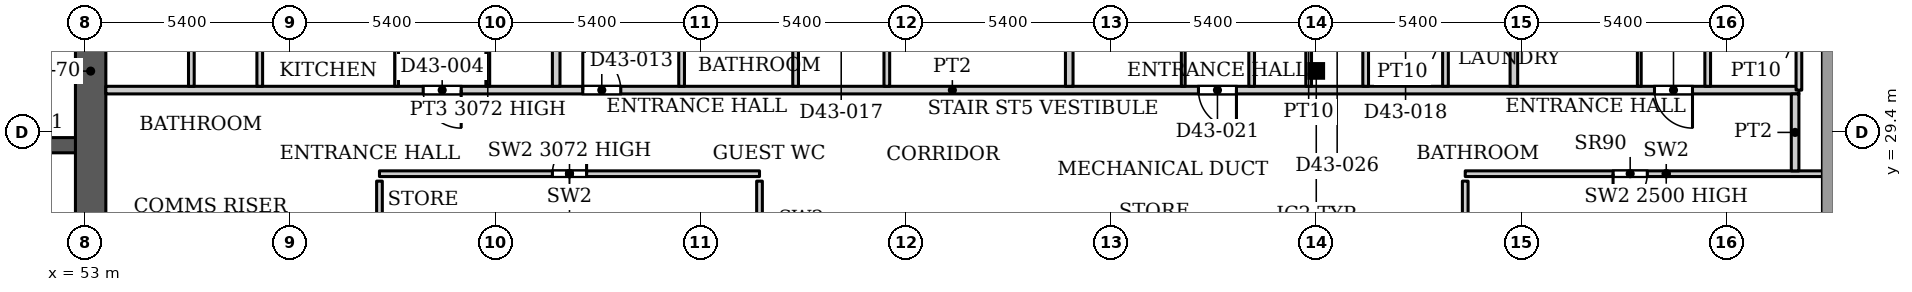
"""IFC4 building model, lengths in metres.
Left out: names, types, materials, properties, quantities, classifications, styles, units other than length and angle.
Written with IfcOpenShell. Run it as: python <this file> out.ifc"""

import sys

from ifc_helpers import new_model, si_unit, direction, frame, frame_2d, origin, origin_2d, place, context, subcontext, project, spatial, rectangle, hollow_rectangle, extrude, source, transform, mapped, element, fill, save


model = new_model("IFC4")
c1 = context("Model", 3, precision=1e-05, world=origin(), true_north=direction((0.0, 1.0)))
c2 = subcontext(c1, "Body", "Model", "MODEL_VIEW")
j1 = project(units=[si_unit("LENGTHUNIT", "METRE"), si_unit("PLANEANGLEUNIT", "RADIAN")], contexts=[c1])
p1 = place(None, origin())
s1 = spatial("IfcSite", under=j1, at=p1, CompositionType="ELEMENT")
p2 = place(p1, origin())
s2 = spatial("IfcBuilding", under=s1, at=p2, CompositionType="ELEMENT")
p3 = place(p2, frame((0.0, 0.0, 191.6)))
s3 = spatial("IfcBuildingStorey", under=s2, at=p3, CompositionType="ELEMENT", Elevation=191.6)
p4 = place(p3, frame((85.4, 31.005, 0.0), z_axis=(0.0, 0.0, 1.0), x_axis=(1.0, 0.0, 0.0)))
e1 = element("IfcColumn", 1, at=p4, inside=s3, PredefinedType="COLUMN", context=c2, shape_type="SweptSolid", body=[
    extrude(hollow_rectangle(XDim=0.305, YDim=0.305, WallThickness=0.016, InnerFilletRadius=0.016, OuterFilletRadius=0.032, at=origin_2d()), origin(), (0.0, 0.0, 1.0), 3.9),
])
p5 = place(p3, frame((34.75, 29.05, 0.0), z_axis=(0.0, 0.0, 1.0), x_axis=(1.0, 0.0, 0.0)))
e2 = element("IfcWall", 2, at=p5, inside=s3, PredefinedType="SHEAR", context=c2, shape_type="SweptSolid", body=[
    extrude(rectangle(XDim=18.4, YDim=0.4, at=frame_2d((9.2, 0.0))), origin(), (0.0, 0.0, 1.0), 3.9),
])
p6 = place(p5, frame((0.875, 0.0, 0.0)))
e3 = element("IfcOpeningElement", 3, at=p6, cuts=e2, PredefinedType="OPENING", context=c2, shape_type="SweptSolid", body=[
    extrude(rectangle(XDim=1.1, YDim=2.2, at=frame_2d((0.55, 1.1))), frame((0.0, 0.21, 0.0), z_axis=(0.0, -1.0, 0.0), x_axis=(1.0, 0.0, 0.0)), (0.0, 0.0, 1.0), 0.42),
])
p7 = place(p5, frame((3.725, 0.0, 0.0)))
e4 = element("IfcOpeningElement", 4, at=p7, cuts=e2, PredefinedType="OPENING", context=c2, shape_type="SweptSolid", body=[
    extrude(rectangle(XDim=1.1, YDim=2.2, at=frame_2d((0.55, 1.1))), frame((0.0, 0.21, 0.0), z_axis=(0.0, -1.0, 0.0), x_axis=(1.0, 0.0, 0.0)), (0.0, 0.0, 1.0), 0.42),
])
p8 = place(p5, frame((6.575, 0.0, 0.0)))
e5 = element("IfcOpeningElement", 5, at=p8, cuts=e2, PredefinedType="OPENING", context=c2, shape_type="SweptSolid", body=[
    extrude(rectangle(XDim=1.1, YDim=2.2, at=frame_2d((0.55, 1.1))), frame((0.0, 0.21, 0.0), z_axis=(0.0, -1.0, 0.0), x_axis=(1.0, 0.0, 0.0)), (0.0, 0.0, 1.0), 0.42),
])
p9 = place(p5, frame((9.425, 0.0, 0.0)))
e6 = element("IfcOpeningElement", 6, at=p9, cuts=e2, PredefinedType="OPENING", context=c2, shape_type="SweptSolid", body=[
    extrude(rectangle(XDim=1.1, YDim=2.2, at=frame_2d((0.55, 1.1))), frame((0.0, 0.21, 0.0), z_axis=(0.0, -1.0, 0.0), x_axis=(1.0, 0.0, 0.0)), (0.0, 0.0, 1.0), 0.42),
])
p10 = place(p5, frame((12.275, 0.0, 0.0)))
e7 = element("IfcOpeningElement", 7, at=p10, cuts=e2, PredefinedType="OPENING", context=c2, shape_type="SweptSolid", body=[
    extrude(rectangle(XDim=1.1, YDim=2.2, at=frame_2d((0.55, 1.1))), frame((0.0, 0.21, 0.0), z_axis=(0.0, -1.0, 0.0), x_axis=(1.0, 0.0, 0.0)), (0.0, 0.0, 1.0), 0.42),
])
p11 = place(p5, frame((15.125, 0.0, 0.0)))
e8 = element("IfcOpeningElement", 8, at=p11, cuts=e2, PredefinedType="OPENING", context=c2, shape_type="SweptSolid", body=[
    extrude(rectangle(XDim=1.1, YDim=2.2, at=frame_2d((0.55, 1.1))), frame((0.0, 0.21, 0.0), z_axis=(0.0, -1.0, 0.0), x_axis=(1.0, 0.0, 0.0)), (0.0, 0.0, 1.0), 0.42),
])
p12 = place(p3, frame((53.15, 25.8, 0.0), z_axis=(0.0, 0.0, 1.0), x_axis=(0.0, 1.0, 0.0)))
e9 = element("IfcWall", 9, at=p12, inside=s3, PredefinedType="SHEAR", context=c2, shape_type="SweptSolid", body=[
    extrude(rectangle(XDim=10.4, YDim=0.8, at=frame_2d((5.2, 0.0))), origin(), (0.0, 0.0, 1.0), 3.9),
])
p13 = place(p3, frame((60.75, 28.3, 0.0), z_axis=(0.0, 0.0, 1.0), x_axis=(1.0, 0.0, 0.0)))
e10 = element("IfcWall", 10, at=p13, inside=s3, PredefinedType="PARTITIONING", context=c2, shape_type="SweptSolid", body=[
    extrude(rectangle(XDim=10.0, YDim=0.15, at=frame_2d((5.0, 0.0))), origin(), (0.0, 0.0, 1.0), 3.072),
])
p14 = place(p13, frame((4.55, 0.0, 0.0)))
e11 = element("IfcOpeningElement", 11, at=p14, cuts=e10, PredefinedType="OPENING", context=c2, shape_type="SweptSolid", body=[
    extrude(rectangle(XDim=0.9, YDim=2.2, at=frame_2d((0.45, 1.1))), frame((0.0, 0.085, 0.0), z_axis=(0.0, -1.0, 0.0), x_axis=(1.0, 0.0, 0.0)), (0.0, 0.0, 1.0), 0.17),
])
p15 = place(p3, frame((60.75, 23.075, 0.0), z_axis=(0.0, 0.0, 1.0), x_axis=(0.0, 1.0, 0.0)))
e12 = element("IfcWall", 12, at=p15, inside=s3, PredefinedType="PARTITIONING", context=c2, shape_type="SweptSolid", body=[
    extrude(rectangle(XDim=5.03, YDim=0.15, at=frame_2d((2.515, 0.0))), origin(), (0.0, 0.0, 1.0), 3.9),
])
p16 = place(p3, frame((70.75, 26.12, 0.0), z_axis=(0.0, 0.0, 1.0), x_axis=(0.0, 1.0, 0.0)))
e13 = element("IfcWall", 13, at=p16, inside=s3, PredefinedType="PARTITIONING", context=c2, shape_type="SweptSolid", body=[
    extrude(rectangle(XDim=1.985, YDim=0.15, at=frame_2d((0.992, 0.0))), origin(), (0.0, 0.0, 1.0), 3.9),
])
p17 = place(p3, frame((89.32, 28.3, 0.0), z_axis=(0.0, 0.0, 1.0), x_axis=(1.0, 0.0, 0.0)))
e14 = element("IfcWall", 14, at=p17, inside=s3, PredefinedType="PARTITIONING", context=c2, shape_type="SweptSolid", body=[
    extrude(rectangle(XDim=10.578, YDim=0.15, at=frame_2d((5.289, 0.0))), origin(), (0.0, 0.0, 1.0), 2.5),
])
p18 = place(p17, frame((3.89, 0.0, 0.0)))
e15 = element("IfcOpeningElement", 15, at=p18, cuts=e14, PredefinedType="OPENING", context=c2, shape_type="SweptSolid", body=[
    extrude(rectangle(XDim=0.9, YDim=2.2, at=frame_2d((0.45, 1.1))), frame((0.0, 0.085, 0.0), z_axis=(0.0, -1.0, 0.0), x_axis=(1.0, 0.0, 0.0)), (0.0, 0.0, 1.0), 0.17),
])
p19 = place(p3, frame((89.32, 25.62, 0.0), z_axis=(0.0, 0.0, 1.0), x_axis=(0.0, 1.0, 0.0)))
e16 = element("IfcWall", 16, at=p19, inside=s3, PredefinedType="PARTITIONING", context=c2, shape_type="SweptSolid", body=[
    extrude(rectangle(XDim=2.485, YDim=0.15, at=frame_2d((1.242, 0.0))), origin(), (0.0, 0.0, 1.0), 3.9),
])
p20 = place(p3, frame((53.549, 30.5, 0.0), z_axis=(0.0, 0.0, 1.0), x_axis=(1.0, 0.0, 0.0)))
e17 = element("IfcWall", 17, at=p20, inside=s3, PredefinedType="PARTITIONING", context=c2, shape_type="SweptSolid", body=[
    extrude(rectangle(XDim=44.551, YDim=0.2, at=frame_2d((22.275, 0.0))), origin(), (0.0, 0.0, 1.0), 3.6),
])
p21 = place(p20, frame((8.351, 0.0, 0.0)))
e18 = element("IfcOpeningElement", 18, at=p21, cuts=e17, PredefinedType="OPENING", context=c2, shape_type="SweptSolid", body=[
    extrude(rectangle(XDim=1.0, YDim=2.1, at=frame_2d((0.5, 1.05))), frame((0.0, 0.11, 0.0), z_axis=(0.0, -1.0, 0.0), x_axis=(1.0, 0.0, 0.0)), (0.0, 0.0, 1.0), 0.22),
])
p22 = place(p20, frame((12.551, 0.0, 0.0)))
e19 = element("IfcOpeningElement", 19, at=p22, cuts=e17, PredefinedType="OPENING", context=c2, shape_type="SweptSolid", body=[
    extrude(rectangle(XDim=1.0, YDim=2.1, at=frame_2d((0.5, 1.05))), frame((0.0, 0.11, 0.0), z_axis=(0.0, -1.0, 0.0), x_axis=(1.0, 0.0, 0.0)), (0.0, 0.0, 1.0), 0.22),
])
p23 = place(p20, frame((28.751, 0.0, 0.0)))
e20 = element("IfcOpeningElement", 20, at=p23, cuts=e17, PredefinedType="OPENING", context=c2, shape_type="SweptSolid", body=[
    extrude(rectangle(XDim=1.0, YDim=2.1, at=frame_2d((0.5, 1.05))), frame((0.0, 0.11, 0.0), z_axis=(0.0, -1.0, 0.0), x_axis=(1.0, 0.0, 0.0)), (0.0, 0.0, 1.0), 0.22),
])
p24 = place(p20, frame((40.751, 0.0, 0.0)))
e21 = element("IfcOpeningElement", 21, at=p24, cuts=e17, PredefinedType="OPENING", context=c2, shape_type="SweptSolid", body=[
    extrude(rectangle(XDim=1.0, YDim=2.1, at=frame_2d((0.5, 1.05))), frame((0.0, 0.11, 0.0), z_axis=(0.0, -1.0, 0.0), x_axis=(1.0, 0.0, 0.0)), (0.0, 0.0, 1.0), 0.22),
])
for number, where, z_axis, x_axis in (
    (22, (55.8, 30.6, 0.0), (0.0, 0.0, 1.0), (0.0, 1.0, 0.0)),
    (23, (57.6, 30.6, 0.0), (0.0, 0.0, 1.0), (0.0, 1.0, 0.0)),
):
    element("IfcWall", number, at=place(p3, frame(where, z_axis=z_axis, x_axis=x_axis)), inside=s3, PredefinedType="PARTITIONING", context=c2, shape_type="SweptSolid", body=[
        extrude(rectangle(XDim=3.025, YDim=0.15, at=frame_2d((1.512, 0.0))), origin(), (0.0, 0.0, 1.0), 3.6),
    ])
p25 = place(p3, frame((61.2, 30.6, 0.0), z_axis=(0.0, 0.0, 1.0), x_axis=(0.0, 1.0, 0.0)))
e24 = element("IfcWall", 24, at=p25, inside=s3, PredefinedType="PARTITIONING", context=c2, shape_type="SweptSolid", body=[
    extrude(rectangle(XDim=3.025, YDim=0.1, at=frame_2d((1.512, 0.0))), origin(), (0.0, 0.0, 1.0), 3.6),
])
p26 = place(p3, frame((63.6, 30.6, 0.0), z_axis=(0.0, 0.0, 1.0), x_axis=(0.0, 1.0, 0.0)))
e25 = element("IfcWall", 25, at=p26, inside=s3, PredefinedType="PARTITIONING", context=c2, shape_type="SweptSolid", body=[
    extrude(rectangle(XDim=3.15, YDim=0.1, at=frame_2d((1.575, 0.0))), origin(), (0.0, 0.0, 1.0), 3.072),
])
p27 = place(p3, frame((65.4, 30.6, 0.0), z_axis=(0.0, 0.0, 1.0), x_axis=(0.0, 1.0, 0.0)))
e26 = element("IfcWall", 26, at=p27, inside=s3, PredefinedType="PARTITIONING", context=c2, shape_type="SweptSolid", body=[
    extrude(rectangle(XDim=13.3, YDim=0.2, at=frame_2d((6.65, 0.0))), origin(), (0.0, 0.0, 1.0), 3.6),
])
for number, where, z_axis, x_axis in (
    (27, (68.7, 30.6, 0.0), (0.0, 0.0, 1.0), (0.0, 1.0, 0.0)),
    (28, (71.7, 30.6, 0.0), (0.0, 0.0, 1.0), (0.0, 1.0, 0.0)),
    (29, (74.1, 30.6, 0.0), (0.0, 0.0, 1.0), (0.0, 1.0, 0.0)),
):
    element("IfcWall", number, at=place(p3, frame(where, z_axis=z_axis, x_axis=x_axis)), inside=s3, PredefinedType="PARTITIONING", context=c2, shape_type="SweptSolid", body=[
        extrude(rectangle(XDim=3.025, YDim=0.15, at=frame_2d((1.512, 0.0))), origin(), (0.0, 0.0, 1.0), 3.6),
    ])
p28 = place(p3, frame((78.9, 30.6, 0.0), z_axis=(0.0, 0.0, 1.0), x_axis=(0.0, 1.0, 0.0)))
e30 = element("IfcWall", 30, at=p28, inside=s3, PredefinedType="PARTITIONING", context=c2, shape_type="SweptSolid", body=[
    extrude(rectangle(XDim=13.3, YDim=0.2, at=frame_2d((6.65, 0.0))), origin(), (0.0, 0.0, 1.0), 3.6),
])
p29 = place(p3, frame((81.9, 30.6, 0.0), z_axis=(0.0, 0.0, 1.0), x_axis=(0.0, 1.0, 0.0)))
e31 = element("IfcWall", 31, at=p29, inside=s3, PredefinedType="PARTITIONING", context=c2, shape_type="SweptSolid", body=[
    extrude(rectangle(XDim=3.025, YDim=0.1, at=frame_2d((1.512, 0.0))), origin(), (0.0, 0.0, 1.0), 3.6),
])
p30 = place(p3, frame((83.7, 30.6, 0.0), z_axis=(0.0, 0.0, 1.0), x_axis=(0.0, 1.0, 0.0)))
e32 = element("IfcWall", 32, at=p30, inside=s3, PredefinedType="PARTITIONING", context=c2, shape_type="SweptSolid", body=[
    extrude(rectangle(XDim=3.025, YDim=0.15, at=frame_2d((1.512, 0.0))), origin(), (0.0, 0.0, 1.0), 3.6),
])
p31 = place(p3, frame((85.2, 30.6, 0.0), z_axis=(0.0, 0.0, 1.0), x_axis=(0.0, 1.0, 0.0)))
e33 = element("IfcWall", 33, at=p31, inside=s3, PredefinedType="PARTITIONING", context=c2, shape_type="SweptSolid", body=[
    extrude(rectangle(XDim=3.025, YDim=0.15, at=frame_2d((1.512, 0.0))), origin(), (0.0, 0.0, 1.0), 3.447),
])
for number, where, z_axis, x_axis in (
    (34, (86.7, 30.6, 0.0), (0.0, 0.0, 1.0), (0.0, 1.0, 0.0)),
    (35, (88.8, 30.6, 0.0), (0.0, 0.0, 1.0), (0.0, 1.0, 0.0)),
):
    element("IfcWall", number, at=place(p3, frame(where, z_axis=z_axis, x_axis=x_axis)), inside=s3, PredefinedType="PARTITIONING", context=c2, shape_type="SweptSolid", body=[
        extrude(rectangle(XDim=3.025, YDim=0.15, at=frame_2d((1.512, 0.0))), origin(), (0.0, 0.0, 1.0), 3.6),
    ])
p32 = place(p3, frame((90.6, 30.6, 0.0), z_axis=(0.0, 0.0, 1.0), x_axis=(0.0, 1.0, 0.0)))
e36 = element("IfcWall", 36, at=p32, inside=s3, PredefinedType="PARTITIONING", context=c2, shape_type="SweptSolid", body=[
    extrude(rectangle(XDim=13.3, YDim=0.2, at=frame_2d((6.65, 0.0))), origin(), (0.0, 0.0, 1.0), 2.5),
])
p33 = place(p3, frame((93.9, 30.6, 0.0), z_axis=(0.0, 0.0, 1.0), x_axis=(0.0, 1.0, 0.0)))
e37 = element("IfcWall", 37, at=p33, inside=s3, PredefinedType="PARTITIONING", context=c2, shape_type="SweptSolid", body=[
    extrude(rectangle(XDim=3.025, YDim=0.1, at=frame_2d((1.512, 0.0))), origin(), (0.0, 0.0, 1.0), 3.6),
])
p34 = place(p3, frame((95.7, 30.6, 0.0), z_axis=(0.0, 0.0, 1.0), x_axis=(0.0, 1.0, 0.0)))
e38 = element("IfcWall", 38, at=p34, inside=s3, PredefinedType="PARTITIONING", context=c2, shape_type="SweptSolid", body=[
    extrude(rectangle(XDim=3.175, YDim=0.15, at=frame_2d((1.587, 0.0))), origin(), (0.0, 0.0, 1.0), 3.6),
])
p35 = place(p3, frame((98.0, 28.374, 0.0), z_axis=(0.0, 0.0, 1.0), x_axis=(0.0, 1.0, 0.0)))
e39 = element("IfcWall", 39, at=p35, inside=s3, PredefinedType="PARTITIONING", context=c2, shape_type="SweptSolid", body=[
    extrude(rectangle(XDim=2.026, YDim=0.2, at=frame_2d((1.013, 0.0))), origin(), (0.0, 0.0, 1.0), 3.6),
])
p36 = place(p3, frame((98.1, 30.5, 0.0), z_axis=(0.0, 0.0, 1.0), x_axis=(0.0, 1.0, 0.0)))
e40 = element("IfcWall", 40, at=p36, inside=s3, PredefinedType="PARTITIONING", context=c2, shape_type="SweptSolid", body=[
    extrude(rectangle(XDim=3.275, YDim=0.15, at=frame_2d((1.637, 0.0))), origin(), (0.0, 0.0, 1.0), 3.6),
])
m1 = source(origin(), c2, "Body", "SweptSolid", [
    extrude(rectangle(XDim=0.9, YDim=2.2, at=frame_2d((0.45, 1.1))), frame((0.0, 0.025, 0.0), z_axis=(0.0, -1.0, 0.0), x_axis=(1.0, 0.0, 0.0)), (0.0, 0.0, 1.0), 0.05),
])
p37 = place(p14, origin())
e41 = element("IfcDoor", 41, at=p37, inside=s3, OperationType="SINGLE_SWING_LEFT", PredefinedType="DOOR", context=c2, shape_type="MappedRepresentation", body=[
    mapped(m1, transform((0.0, 0.0, 0.0), x_axis=(1.0, 0.0, 0.0), y_axis=(0.0, 1.0, 0.0), z_axis=(0.0, 0.0, 1.0), scale=1.0)),
])
fill(e11, e41)
p38 = place(p18, origin())
e42 = element("IfcDoor", 42, at=p38, inside=s3, OperationType="SINGLE_SWING_RIGHT", PredefinedType="DOOR", context=c2, shape_type="MappedRepresentation", body=[
    mapped(m1, transform((0.0, 0.0, 0.0), x_axis=(1.0, 0.0, 0.0), y_axis=(0.0, 1.0, 0.0), z_axis=(0.0, 0.0, 1.0), scale=1.0)),
])
fill(e15, e42)
m2 = source(origin(), c2, "Body", "SweptSolid", [
    extrude(rectangle(XDim=1.0, YDim=2.1, at=frame_2d((0.5, 1.05))), frame((0.0, 0.025, 0.0), z_axis=(0.0, -1.0, 0.0), x_axis=(1.0, 0.0, 0.0)), (0.0, 0.0, 1.0), 0.05),
])
p39 = place(p21, origin())
e43 = element("IfcDoor", 43, at=p39, inside=s3, OperationType="SINGLE_SWING_RIGHT", PredefinedType="DOOR", context=c2, shape_type="MappedRepresentation", body=[
    mapped(m2, transform((0.0, 0.0, 0.0), x_axis=(1.0, 0.0, 0.0), y_axis=(0.0, 1.0, 0.0), z_axis=(0.0, 0.0, 1.0), scale=1.0)),
])
fill(e18, e43)
p40 = place(p22, origin())
e44 = element("IfcDoor", 44, at=p40, inside=s3, OperationType="SINGLE_SWING_LEFT", PredefinedType="DOOR", context=c2, shape_type="MappedRepresentation", body=[
    mapped(m2, transform((0.0, 0.0, 0.0), x_axis=(1.0, 0.0, 0.0), y_axis=(0.0, 1.0, 0.0), z_axis=(0.0, 0.0, 1.0), scale=1.0)),
])
fill(e19, e44)
p41 = place(p23, origin())
e45 = element("IfcDoor", 45, at=p41, inside=s3, OperationType="SINGLE_SWING_RIGHT", PredefinedType="DOOR", context=c2, shape_type="MappedRepresentation", body=[
    mapped(m2, transform((0.0, 0.0, 0.0), x_axis=(1.0, 0.0, 0.0), y_axis=(0.0, 1.0, 0.0), z_axis=(0.0, 0.0, 1.0), scale=1.0)),
])
fill(e20, e45)
p42 = place(p24, origin())
e46 = element("IfcDoor", 46, at=p42, inside=s3, OperationType="SINGLE_SWING_RIGHT", PredefinedType="DOOR", context=c2, shape_type="MappedRepresentation", body=[
    mapped(m2, transform((0.0, 0.0, 0.0), x_axis=(1.0, 0.0, 0.0), y_axis=(0.0, 1.0, 0.0), z_axis=(0.0, 0.0, 1.0), scale=1.0)),
])
fill(e21, e46)
save(model, sys.argv[1])
